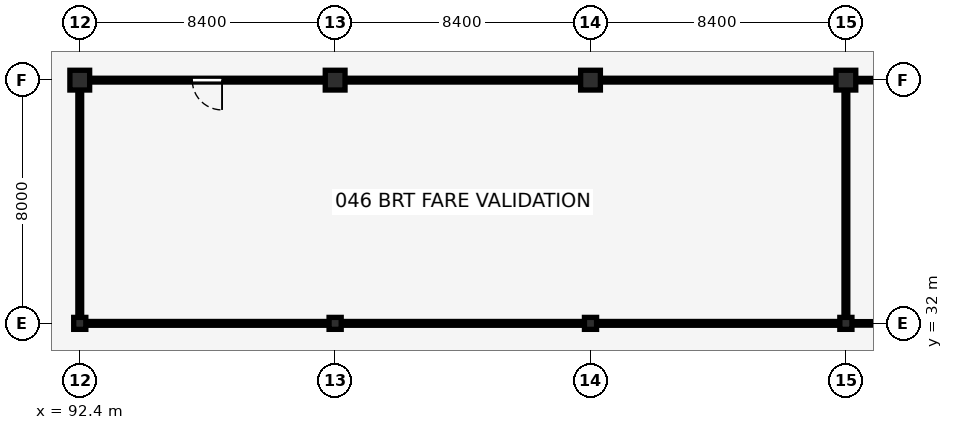
"""IFC4 building model, lengths in metres.
Left out: names, types, materials, properties, quantities, classifications, styles, units other than length and angle.
Written with IfcOpenShell. Run it as: python <this file> out.ifc"""

import sys

from ifc_helpers import new_model, si_unit, direction, frame, frame_2d, origin, origin_2d, place, context, subcontext, project, spatial, rectangle, circle, i_section, extrude, element, fill, save


model = new_model("IFC4")
c1 = context("Model", 3, precision=1e-05, world=origin(), true_north=direction((0.0, 1.0)))
c2 = subcontext(c1, "Body", "Model", "MODEL_VIEW")
j1 = project(units=[si_unit("LENGTHUNIT", "METRE"), si_unit("PLANEANGLEUNIT", "RADIAN")], contexts=[c1])
p1 = place(None, origin())
s1 = spatial("IfcSite", under=j1, at=p1, CompositionType="ELEMENT")
p2 = place(p1, origin())
s2 = spatial("IfcBuilding", under=s1, at=p2, CompositionType="ELEMENT")
p3 = place(p2, origin())
s3 = spatial("IfcBuildingStorey", under=s2, at=p3, CompositionType="ELEMENT", Elevation=0.0)
p4 = place(p3, frame((92.4, 32.0, 0.0), z_axis=(0.0, 0.0, 1.0), x_axis=(1.0, 0.0, 0.0)))
e1 = element("IfcColumn", 1, at=p4, inside=s3, PredefinedType="COLUMN", context=c2, shape_type="SweptSolid", body=[
    extrude(i_section(OverallWidth=0.399, OverallDepth=0.394, WebThickness=0.023, FlangeThickness=0.037, FilletRadius=0.015, at=origin_2d()), origin(), (0.0, 0.0, 1.0), 5.15),
])
p5 = place(p3, frame((92.4, 40.0, 0.0), z_axis=(0.0, 0.0, 1.0), x_axis=(1.0, 0.0, 0.0)))
e2 = element("IfcColumn", 2, at=p5, inside=s3, PredefinedType="COLUMN", context=c2, shape_type="SweptSolid", body=[
    extrude(circle(Radius=0.325, at=origin_2d()), origin(), (0.0, 0.0, 1.0), 5.15),
])
p6 = place(p3, frame((100.8, 32.0, 0.0), z_axis=(0.0, 0.0, 1.0), x_axis=(1.0, 0.0, 0.0)))
e3 = element("IfcColumn", 3, at=p6, inside=s3, PredefinedType="COLUMN", context=c2, shape_type="SweptSolid", body=[
    extrude(i_section(OverallWidth=0.399, OverallDepth=0.394, WebThickness=0.023, FlangeThickness=0.037, FilletRadius=0.015, at=origin_2d()), origin(), (0.0, 0.0, 1.0), 5.15),
])
p7 = place(p3, frame((100.8, 40.0, 0.0), z_axis=(0.0, 0.0, 1.0), x_axis=(1.0, 0.0, 0.0)))
e4 = element("IfcColumn", 4, at=p7, inside=s3, PredefinedType="COLUMN", context=c2, shape_type="SweptSolid", body=[
    extrude(circle(Radius=0.325, at=origin_2d()), origin(), (0.0, 0.0, 1.0), 5.15),
])
p8 = place(p3, frame((109.2, 32.0, 0.0), z_axis=(0.0, 0.0, 1.0), x_axis=(1.0, 0.0, 0.0)))
e5 = element("IfcColumn", 5, at=p8, inside=s3, PredefinedType="COLUMN", context=c2, shape_type="SweptSolid", body=[
    extrude(i_section(OverallWidth=0.399, OverallDepth=0.394, WebThickness=0.023, FlangeThickness=0.037, FilletRadius=0.015, at=origin_2d()), origin(), (0.0, 0.0, 1.0), 5.15),
])
p9 = place(p3, frame((109.2, 40.0, 0.0), z_axis=(0.0, 0.0, 1.0), x_axis=(1.0, 0.0, 0.0)))
e6 = element("IfcColumn", 6, at=p9, inside=s3, PredefinedType="COLUMN", context=c2, shape_type="SweptSolid", body=[
    extrude(circle(Radius=0.325, at=origin_2d()), origin(), (0.0, 0.0, 1.0), 5.15),
])
p10 = place(p3, frame((117.6, 32.0, 0.0), z_axis=(0.0, 0.0, 1.0), x_axis=(1.0, 0.0, 0.0)))
e7 = element("IfcColumn", 7, at=p10, inside=s3, PredefinedType="COLUMN", context=c2, shape_type="SweptSolid", body=[
    extrude(i_section(OverallWidth=0.399, OverallDepth=0.394, WebThickness=0.023, FlangeThickness=0.037, FilletRadius=0.015, at=origin_2d()), origin(), (0.0, 0.0, 1.0), 5.15),
])
p11 = place(p3, frame((117.6, 40.0, 0.0), z_axis=(0.0, 0.0, 1.0), x_axis=(1.0, 0.0, 0.0)))
e8 = element("IfcColumn", 8, at=p11, inside=s3, PredefinedType="COLUMN", context=c2, shape_type="SweptSolid", body=[
    extrude(circle(Radius=0.325, at=origin_2d()), origin(), (0.0, 0.0, 1.0), 5.15),
])
p12 = place(p3, frame((92.715, 40.0, 0.0), z_axis=(0.0, 0.0, 1.0), x_axis=(1.0, 0.0, 0.0)))
e9 = element("IfcWall", 9, at=p12, inside=s3, PredefinedType="PARTITIONING", context=c2, shape_type="SweptSolid", body=[
    extrude(rectangle(XDim=7.77, YDim=0.125, at=frame_2d((3.885, 0.0))), origin(), (0.0, 0.0, 1.0), 4.605),
])
p13 = place(p12, frame((4.365, 0.0, 0.0), z_axis=(0.0, 0.0, 1.0), x_axis=(-1.0, 0.0, 0.0)))
e10 = element("IfcOpeningElement", 10, at=p13, cuts=e9, PredefinedType="OPENING", context=c2, shape_type="SweptSolid", body=[
    extrude(rectangle(XDim=0.98, YDim=2.15, at=frame_2d((0.49, 1.075))), frame((0.0, 0.073, 0.0), z_axis=(0.0, -1.0, 0.0), x_axis=(1.0, 0.0, 0.0)), (0.0, 0.0, 1.0), 0.145),
])
p14 = place(p3, frame((117.915, 40.0, 0.0), z_axis=(0.0, 0.0, 1.0), x_axis=(1.0, 0.0, 0.0)))
e11 = element("IfcWall", 11, at=p14, inside=s3, PredefinedType="PARTITIONING", context=c2, shape_type="SweptSolid", body=[
    extrude(rectangle(XDim=7.77, YDim=0.115, at=frame_2d((3.885, 0.0))), origin(), (0.0, 0.0, 1.0), 4.605),
])
p15 = place(p14, frame((4.335, 0.0, 0.0), z_axis=(0.0, 0.0, 1.0), x_axis=(-1.0, 0.0, 0.0)))
e12 = element("IfcOpeningElement", 12, at=p15, cuts=e11, PredefinedType="OPENING", context=c2, shape_type="SweptSolid", body=[
    extrude(rectangle(XDim=0.95, YDim=2.15, at=frame_2d((0.475, 1.075))), frame((0.0, 0.067, 0.0), z_axis=(0.0, -1.0, 0.0), x_axis=(1.0, 0.0, 0.0)), (0.0, 0.0, 1.0), 0.135),
])
for number, where, z_axis, x_axis in (
    (13, (101.115, 40.0, 0.0), (0.0, 0.0, 1.0), (1.0, 0.0, 0.0)),
    (14, (109.515, 40.0, 0.0), (0.0, 0.0, 1.0), (1.0, 0.0, 0.0)),
):
    element("IfcWall", number, at=place(p3, frame(where, z_axis=z_axis, x_axis=x_axis)), inside=s3, PredefinedType="PARTITIONING", context=c2, shape_type="SweptSolid", body=[
        extrude(rectangle(XDim=7.77, YDim=0.125, at=frame_2d((3.885, 0.0))), origin(), (0.0, 0.0, 1.0), 4.605),
    ])
for number, where, z_axis, x_axis in (
    (15, (92.59, 32.0, 0.0), (0.0, 0.0, 1.0), (1.0, 0.0, 0.0)),
    (16, (100.99, 32.0, 0.0), (0.0, 0.0, 1.0), (1.0, 0.0, 0.0)),
    (17, (109.389, 32.0, 0.0), (0.0, 0.0, 1.0), (1.0, 0.0, 0.0)),
):
    element("IfcWall", number, at=place(p3, frame(where, z_axis=z_axis, x_axis=x_axis)), inside=s3, PredefinedType="PARTITIONING", context=c2, shape_type="SweptSolid", body=[
        extrude(rectangle(XDim=8.021, YDim=0.125, at=frame_2d((4.01, 0.0))), origin(), (0.0, 0.0, 1.0), 4.533),
    ])
for number, where, z_axis, x_axis in (
    (18, (92.4, 32.187, 0.0), (0.0, 0.0, 1.0), (0.0, 1.0, 0.0)),
    (19, (117.6, 32.187, 0.0), (0.0, 0.0, 1.0), (0.0, 1.0, 0.0)),
):
    element("IfcWall", number, at=place(p3, frame(where, z_axis=z_axis, x_axis=x_axis)), inside=s3, PredefinedType="PARTITIONING", context=c2, shape_type="SweptSolid", body=[
        extrude(rectangle(XDim=7.498, YDim=0.125, at=frame_2d((3.749, 0.0))), origin(), (0.0, 0.0, 1.0), 4.542),
    ])
p16 = place(p3, frame((117.79, 32.0, 0.0), z_axis=(0.0, 0.0, 1.0), x_axis=(1.0, 0.0, 0.0)))
e20 = element("IfcWall", 20, at=p16, inside=s3, PredefinedType="PARTITIONING", context=c2, shape_type="SweptSolid", body=[
    extrude(rectangle(XDim=8.021, YDim=0.115, at=frame_2d((4.01, 0.0))), origin(), (0.0, 0.0, 1.0), 4.533),
])
p17 = place(p13, origin())
e21 = element("IfcDoor", 21, at=p17, inside=s3, OperationType="SINGLE_SWING_LEFT", PredefinedType="DOOR", context=c2, shape_type="SweptSolid", body=[
    extrude(rectangle(XDim=0.98, YDim=2.15, at=frame_2d((0.49, 1.075))), frame((0.0, 0.025, 0.0), z_axis=(0.0, -1.0, 0.0), x_axis=(1.0, 0.0, 0.0)), (0.0, 0.0, 1.0), 0.05),
])
fill(e10, e21)
save(model, sys.argv[1])
